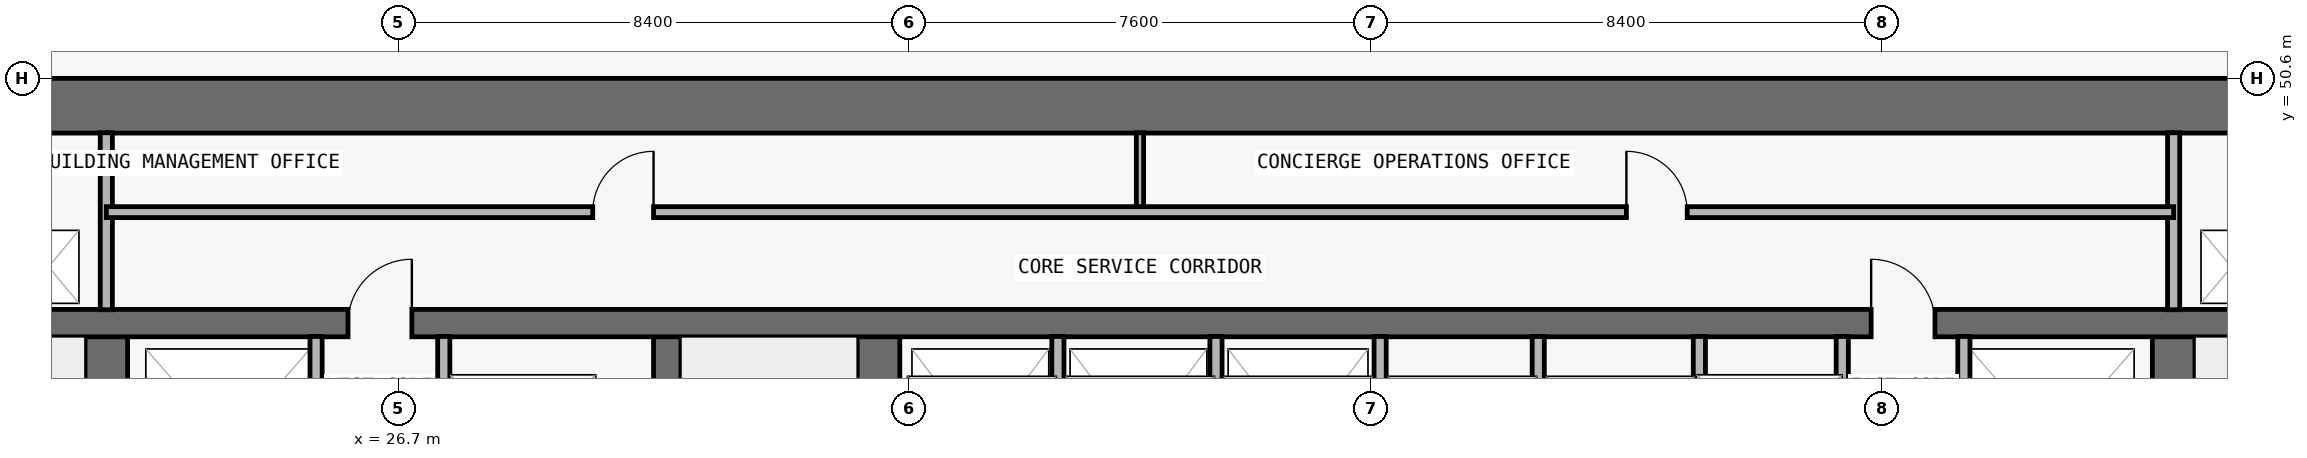
"""IFC4 building model, lengths in metres.
Left out: names, types, materials, properties, quantities, classifications, styles, units other than length and angle.
Written with IfcOpenShell. Run it as: python <this file> out.ifc"""

import sys

from ifc_helpers import new_model, si_unit, direction, frame, frame_2d, origin, place, context, subcontext, project, spatial, rectangle, extrude, element, fill, save


model = new_model("IFC4")
c1 = context("Model", 3, precision=1e-05, world=origin(), true_north=direction((0.0, 1.0)))
c2 = subcontext(c1, "Body", "Model", "MODEL_VIEW")
j1 = project(units=[si_unit("LENGTHUNIT", "METRE"), si_unit("PLANEANGLEUNIT", "RADIAN")], contexts=[c1])
p1 = place(None, origin())
s1 = spatial("IfcSite", under=j1, at=p1, CompositionType="ELEMENT")
p2 = place(p1, origin())
s2 = spatial("IfcBuilding", under=s1, at=p2, CompositionType="ELEMENT")
p3 = place(p2, origin())
s3 = spatial("IfcBuildingStorey", under=s2, at=p3, CompositionType="ELEMENT", Elevation=0.0)
p4 = place(p3, frame((17.75, 50.15, 0.0), z_axis=(0.0, 0.0, 1.0), x_axis=(1.0, 0.0, 0.0)))
e1 = element("IfcWall", 1, at=p4, inside=s3, PredefinedType="SHEAR", context=c2, shape_type="SweptSolid", body=[
    extrude(rectangle(XDim=42.3, YDim=0.9, at=frame_2d((21.15, 0.0))), origin(), (0.0, 0.0, 1.0), 5.1),
])
p5 = place(p3, frame((21.9, 36.9, 0.0), z_axis=(0.0, 0.0, 1.0), x_axis=(0.0, 1.0, 0.0)))
e2 = element("IfcWall", 2, at=p5, inside=s3, PredefinedType="SHEAR", context=c2, shape_type="SweptSolid", body=[
    extrude(rectangle(XDim=9.675, YDim=0.7, at=frame_2d((4.837, 0.0))), origin(), (0.0, 0.0, 1.0), 5.1),
])
p6 = place(p5, frame((0.65, 0.0, 0.0)))
e3 = element("IfcOpeningElement", 3, at=p6, cuts=e2, PredefinedType="OPENING", context=c2, shape_type="SweptSolid", body=[
    extrude(rectangle(XDim=1.1, YDim=2.15, at=frame_2d((0.55, 1.075))), frame((0.0, 0.36, 0.0), z_axis=(0.0, -1.0, 0.0), x_axis=(1.0, 0.0, 0.0)), (0.0, 0.0, 1.0), 0.72),
])
p7 = place(p3, frame((55.9, 36.9, 0.0), z_axis=(0.0, 0.0, 1.0), x_axis=(0.0, 1.0, 0.0)))
e4 = element("IfcWall", 4, at=p7, inside=s3, PredefinedType="SHEAR", context=c2, shape_type="SweptSolid", body=[
    extrude(rectangle(XDim=9.675, YDim=0.7, at=frame_2d((4.837, 0.0))), origin(), (0.0, 0.0, 1.0), 5.1),
])
p8 = place(p7, frame((0.65, 0.0, 0.0)))
e5 = element("IfcOpeningElement", 5, at=p8, cuts=e4, PredefinedType="OPENING", context=c2, shape_type="SweptSolid", body=[
    extrude(rectangle(XDim=1.1, YDim=2.15, at=frame_2d((0.55, 1.075))), frame((0.0, 0.36, 0.0), z_axis=(0.0, -1.0, 0.0), x_axis=(1.0, 0.0, 0.0)), (0.0, 0.0, 1.0), 0.72),
])
p9 = place(p3, frame((31.125, 36.9, 0.0), z_axis=(0.0, 0.0, 1.0), x_axis=(0.0, 1.0, 0.0)))
e6 = element("IfcWall", 6, at=p9, inside=s3, PredefinedType="SHEAR", context=c2, shape_type="SweptSolid", body=[
    extrude(rectangle(XDim=9.675, YDim=0.45, at=frame_2d((4.837, 0.0))), origin(), (0.0, 0.0, 1.0), 5.1),
])
p10 = place(p3, frame((34.6, 36.9, 0.0), z_axis=(0.0, 0.0, 1.0), x_axis=(0.0, 1.0, 0.0)))
e7 = element("IfcWall", 7, at=p10, inside=s3, PredefinedType="SHEAR", context=c2, shape_type="SweptSolid", body=[
    extrude(rectangle(XDim=9.675, YDim=0.7, at=frame_2d((4.837, 0.0))), origin(), (0.0, 0.0, 1.0), 5.1),
])
p11 = place(p3, frame((18.2, 46.575, 0.0), z_axis=(0.0, 0.0, 1.0), x_axis=(1.0, 0.0, 0.0)))
e8 = element("IfcWall", 8, at=p11, inside=s3, PredefinedType="SHEAR", context=c2, shape_type="SweptSolid", body=[
    extrude(rectangle(XDim=41.4, YDim=0.45, at=frame_2d((20.7, 0.0))), origin(), (0.0, 0.0, 1.0), 5.1),
])
p12 = place(p11, frame((7.675, 0.0, 0.0)))
e9 = element("IfcOpeningElement", 9, at=p12, cuts=e8, PredefinedType="OPENING", context=c2, shape_type="SweptSolid", body=[
    extrude(rectangle(XDim=1.05, YDim=2.15, at=frame_2d((0.525, 1.075))), frame((0.0, 0.235, 0.0), z_axis=(0.0, -1.0, 0.0), x_axis=(1.0, 0.0, 0.0)), (0.0, 0.0, 1.0), 0.47),
])
p13 = place(p11, frame((32.725, 0.0, 0.0)))
e10 = element("IfcOpeningElement", 10, at=p13, cuts=e8, PredefinedType="OPENING", context=c2, shape_type="SweptSolid", body=[
    extrude(rectangle(XDim=1.05, YDim=2.15, at=frame_2d((0.525, 1.075))), frame((0.0, 0.235, 0.0), z_axis=(0.0, -1.0, 0.0), x_axis=(1.0, 0.0, 0.0)), (0.0, 0.0, 1.0), 0.47),
])
p14 = place(p3, frame((21.9, 46.795, 0.0), z_axis=(0.0, 0.0, 1.0), x_axis=(0.0, 1.0, 0.0)))
e11 = element("IfcWall", 11, at=p14, inside=s3, PredefinedType="PARTITIONING", context=c2, shape_type="SweptSolid", body=[
    extrude(rectangle(XDim=2.91, YDim=0.2, at=frame_2d((1.455, 0.0))), origin(), (0.0, 0.0, 1.0), 5.1),
])
for number, where, z_axis, x_axis in (
    (12, (25.35, 43.17, 0.0), (0.0, 0.0, 1.0), (0.0, 1.0, 0.0)),
    (13, (27.45, 43.17, 0.0), (0.0, 0.0, 1.0), (0.0, 1.0, 0.0)),
    (14, (37.55, 43.17, 0.0), (0.0, 0.0, 1.0), (0.0, 1.0, 0.0)),
):
    element("IfcWall", number, at=place(p3, frame(where, z_axis=z_axis, x_axis=x_axis)), inside=s3, PredefinedType="PARTITIONING", context=c2, shape_type="SweptSolid", body=[
        extrude(rectangle(XDim=3.185, YDim=0.2, at=frame_2d((1.593, 0.0))), origin(), (0.0, 0.0, 1.0), 5.1),
    ])
p15 = place(p3, frame((38.9, 48.4, 0.0), z_axis=(0.0, 0.0, 1.0), x_axis=(0.0, 1.0, 0.0)))
e15 = element("IfcWall", 15, at=p15, inside=s3, PredefinedType="PARTITIONING", context=c2, shape_type="SweptSolid", body=[
    extrude(rectangle(XDim=1.305, YDim=0.12, at=frame_2d((0.653, 0.0))), origin(), (0.0, 0.0, 1.0), 5.1),
])
for number, where, z_axis, x_axis in (
    (16, (40.15, 43.17, 0.0), (0.0, 0.0, 1.0), (0.0, 1.0, 0.0)),
    (17, (42.85, 43.17, 0.0), (0.0, 0.0, 1.0), (0.0, 1.0, 0.0)),
    (18, (45.45, 43.17, 0.0), (0.0, 0.0, 1.0), (0.0, 1.0, 0.0)),
    (19, (48.1, 43.17, 0.0), (0.0, 0.0, 1.0), (0.0, 1.0, 0.0)),
    (20, (50.45, 43.17, 0.0), (0.0, 0.0, 1.0), (0.0, 1.0, 0.0)),
    (21, (52.45, 43.17, 0.0), (0.0, 0.0, 1.0), (0.0, 1.0, 0.0)),
):
    element("IfcWall", number, at=place(p3, frame(where, z_axis=z_axis, x_axis=x_axis)), inside=s3, PredefinedType="PARTITIONING", context=c2, shape_type="SweptSolid", body=[
        extrude(rectangle(XDim=3.185, YDim=0.2, at=frame_2d((1.593, 0.0))), origin(), (0.0, 0.0, 1.0), 5.1),
    ])
p16 = place(p3, frame((55.9, 46.795, 0.0), z_axis=(0.0, 0.0, 1.0), x_axis=(0.0, 1.0, 0.0)))
e22 = element("IfcWall", 22, at=p16, inside=s3, PredefinedType="PARTITIONING", context=c2, shape_type="SweptSolid", body=[
    extrude(rectangle(XDim=2.91, YDim=0.2, at=frame_2d((1.455, 0.0))), origin(), (0.0, 0.0, 1.0), 5.1),
])
p17 = place(p3, frame((21.9, 48.4, 0.0), z_axis=(0.0, 0.0, 1.0), x_axis=(1.0, 0.0, 0.0)))
e23 = element("IfcWall", 23, at=p17, inside=s3, PredefinedType="PARTITIONING", context=c2, shape_type="SweptSolid", body=[
    extrude(rectangle(XDim=34.0, YDim=0.18, at=frame_2d((17.0, 0.0))), origin(), (0.0, 0.0, 1.0), 5.1),
])
p18 = place(p17, frame((8.0, 0.0, 0.0)))
e24 = element("IfcOpeningElement", 24, at=p18, cuts=e23, PredefinedType="OPENING", context=c2, shape_type="SweptSolid", body=[
    extrude(rectangle(XDim=1.0, YDim=2.2, at=frame_2d((0.5, 1.1))), frame((0.0, 0.1, 0.0), z_axis=(0.0, -1.0, 0.0), x_axis=(1.0, 0.0, 0.0)), (0.0, 0.0, 1.0), 0.2),
])
p19 = place(p17, frame((25.0, 0.0, 0.0)))
e25 = element("IfcOpeningElement", 25, at=p19, cuts=e23, PredefinedType="OPENING", context=c2, shape_type="SweptSolid", body=[
    extrude(rectangle(XDim=1.0, YDim=2.2, at=frame_2d((0.5, 1.1))), frame((0.0, 0.1, 0.0), z_axis=(0.0, -1.0, 0.0), x_axis=(1.0, 0.0, 0.0)), (0.0, 0.0, 1.0), 0.2),
])
p20 = place(p12, origin())
e26 = element("IfcDoor", 26, at=p20, inside=s3, OperationType="SINGLE_SWING_RIGHT", PredefinedType="DOOR", context=c2, shape_type="SweptSolid", body=[
    extrude(rectangle(XDim=1.05, YDim=2.15, at=frame_2d((0.525, 1.075))), frame((0.0, 0.025, 0.0), z_axis=(0.0, -1.0, 0.0), x_axis=(1.0, 0.0, 0.0)), (0.0, 0.0, 1.0), 0.05),
])
fill(e9, e26)
p21 = place(p13, origin())
e27 = element("IfcDoor", 27, at=p21, inside=s3, OperationType="SINGLE_SWING_LEFT", PredefinedType="DOOR", context=c2, shape_type="SweptSolid", body=[
    extrude(rectangle(XDim=1.05, YDim=2.15, at=frame_2d((0.525, 1.075))), frame((0.0, 0.025, 0.0), z_axis=(0.0, -1.0, 0.0), x_axis=(1.0, 0.0, 0.0)), (0.0, 0.0, 1.0), 0.05),
])
fill(e10, e27)
p22 = place(p18, origin())
e28 = element("IfcDoor", 28, at=p22, inside=s3, OperationType="SINGLE_SWING_RIGHT", PredefinedType="DOOR", context=c2, shape_type="SweptSolid", body=[
    extrude(rectangle(XDim=1.0, YDim=2.2, at=frame_2d((0.5, 1.1))), frame((0.0, 0.025, 0.0), z_axis=(0.0, -1.0, 0.0), x_axis=(1.0, 0.0, 0.0)), (0.0, 0.0, 1.0), 0.05),
])
fill(e24, e28)
p23 = place(p19, origin())
e29 = element("IfcDoor", 29, at=p23, inside=s3, OperationType="SINGLE_SWING_LEFT", PredefinedType="DOOR", context=c2, shape_type="SweptSolid", body=[
    extrude(rectangle(XDim=1.0, YDim=2.2, at=frame_2d((0.5, 1.1))), frame((0.0, 0.025, 0.0), z_axis=(0.0, -1.0, 0.0), x_axis=(1.0, 0.0, 0.0)), (0.0, 0.0, 1.0), 0.05),
])
fill(e25, e29)
save(model, sys.argv[1])
